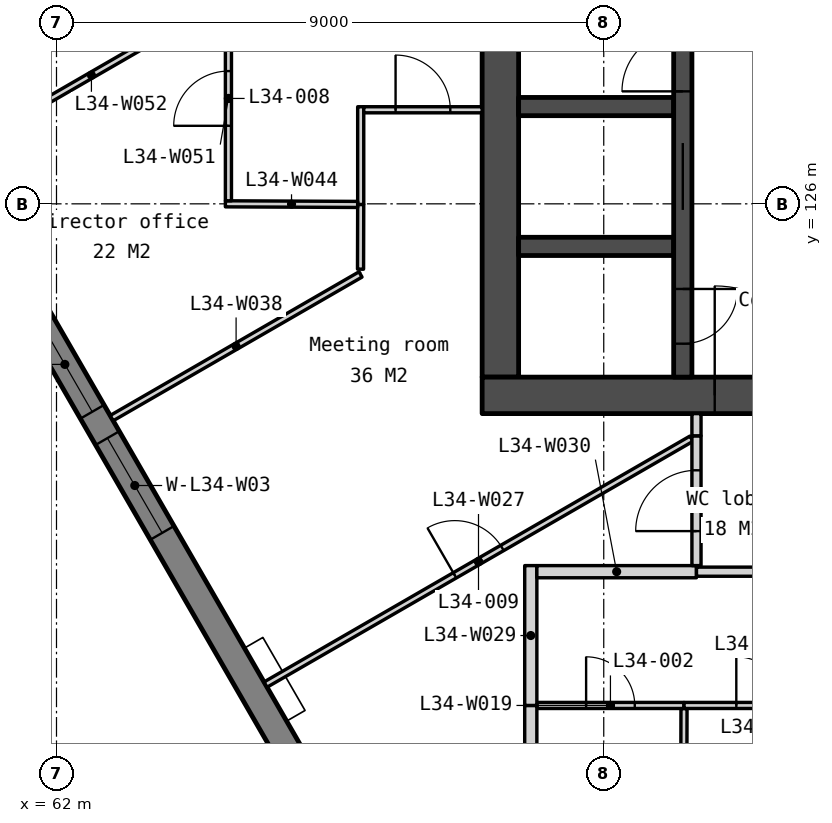
"""IFC4 building model, lengths in metres.
Left out: names, types, materials, properties, quantities, classifications, styles, units other than length and angle.
Written with IfcOpenShell. Run it as: python <this file> out.ifc"""

import sys

from ifc_helpers import new_model, si_unit, direction, frame, frame_2d, origin, place, context, subcontext, project, spatial, polyline, rectangle, outline, extrude, element, fill, save


model = new_model("IFC4")
c1 = context("Model", 3, precision=1e-05, world=origin(), true_north=direction((0.0, 1.0)))
c2 = subcontext(c1, "Body", "Model", "MODEL_VIEW")
j1 = project(units=[si_unit("LENGTHUNIT", "METRE"), si_unit("PLANEANGLEUNIT", "RADIAN")], contexts=[c1])
p1 = place(None, origin())
s1 = spatial("IfcSite", under=j1, at=p1, CompositionType="ELEMENT")
p2 = place(p1, origin())
s2 = spatial("IfcBuilding", under=s1, at=p2, CompositionType="ELEMENT")
p3 = place(p2, frame((0.0, 0.0, 136.4)))
s3 = spatial("IfcBuildingStorey", under=s2, at=p3, CompositionType="ELEMENT", Elevation=136.4)
p4 = place(p3, frame((69.3, 133.95, 0.0), z_axis=(0.0, 0.0, 1.0), x_axis=(0.0, -1.0, 0.0)))
e1 = element("IfcWall", 1, at=p4, inside=s3, PredefinedType="SOLIDWALL", context=c2, shape_type="SweptSolid", body=[
    extrude(rectangle(XDim=10.8, YDim=0.6, at=frame_2d((5.4, 0.0))), origin(), (0.0, 0.0, 1.0), 3.75),
])
p5 = place(p3, frame((69.0, 122.85, 0.0), z_axis=(0.0, 0.0, 1.0), x_axis=(1.0, 0.0, 0.0)))
e2 = element("IfcWall", 2, at=p5, inside=s3, PredefinedType="SOLIDWALL", context=c2, shape_type="SweptSolid", body=[
    extrude(rectangle(XDim=22.0, YDim=0.6, at=frame_2d((11.0, 0.0))), origin(), (0.0, 0.0, 1.0), 3.75),
])
p6 = place(p5, frame((16.375, 0.0, 0.0)))
e3 = element("IfcOpeningElement", 3, at=p6, cuts=e2, PredefinedType="OPENING", context=c2, shape_type="SweptSolid", body=[
    extrude(rectangle(XDim=1.8, YDim=2.1, at=frame_2d((0.9, 1.05))), frame((0.0, 0.31, 0.0), z_axis=(0.0, -1.0, 0.0), x_axis=(1.0, 0.0, 0.0)), (0.0, 0.0, 1.0), 0.62),
])
p7 = place(p5, frame((3.825, 0.0, 0.0)))
e4 = element("IfcOpeningElement", 4, at=p7, cuts=e2, PredefinedType="OPENING", context=c2, shape_type="SweptSolid", body=[
    extrude(rectangle(XDim=1.8, YDim=2.1, at=frame_2d((0.9, 1.05))), frame((0.0, 0.31, 0.0), z_axis=(0.0, -1.0, 0.0), x_axis=(1.0, 0.0, 0.0)), (0.0, 0.0, 1.0), 0.62),
])
p8 = place(p5, frame((12.85, 0.0, 0.0)))
e5 = element("IfcOpeningElement", 5, at=p8, cuts=e2, PredefinedType="OPENING", context=c2, shape_type="SweptSolid", body=[
    extrude(rectangle(XDim=1.5, YDim=2.1, at=frame_2d((0.75, 1.05))), frame((0.0, 0.31, 0.0), z_axis=(0.0, -1.0, 0.0), x_axis=(1.0, 0.0, 0.0)), (0.0, 0.0, 1.0), 0.62),
])
for number, where, z_axis, x_axis in (
    (6, (69.6, 127.6, 0.0), (0.0, 0.0, 1.0), (1.0, 0.0, 0.0)),
    (7, (69.6, 125.3, 0.0), (0.0, 0.0, 1.0), (1.0, 0.0, 0.0)),
):
    element("IfcWall", number, at=place(p3, frame(where, z_axis=z_axis, x_axis=x_axis)), inside=s3, PredefinedType="SOLIDWALL", context=c2, shape_type="SweptSolid", body=[
        extrude(rectangle(XDim=2.55, YDim=0.3, at=frame_2d((1.275, 0.0))), origin(), (0.0, 0.0, 1.0), 3.75),
    ])
p9 = place(p3, frame((72.3, 133.95, 0.0), z_axis=(0.0, 0.0, 1.0), x_axis=(0.0, -1.0, 0.0)))
e8 = element("IfcWall", 8, at=p9, inside=s3, PredefinedType="SOLIDWALL", context=c2, shape_type="SweptSolid", body=[
    extrude(rectangle(XDim=10.8, YDim=0.3, at=frame_2d((5.4, 0.0))), origin(), (0.0, 0.0, 1.0), 3.75),
])
p10 = place(p9, frame((6.95, 0.0, 0.0)))
e9 = element("IfcOpeningElement", 9, at=p10, cuts=e8, PredefinedType="OPENING", context=c2, shape_type="SweptSolid", body=[
    extrude(rectangle(XDim=1.1, YDim=2.1, at=frame_2d((0.55, 1.05))), frame((0.0, 0.16, 0.0), z_axis=(0.0, -1.0, 0.0), x_axis=(1.0, 0.0, 0.0)), (0.0, 0.0, 1.0), 0.32),
])
p11 = place(p9, frame((9.35, 0.0, 0.0)))
e10 = element("IfcOpeningElement", 10, at=p11, cuts=e8, PredefinedType="OPENING", context=c2, shape_type="SweptSolid", body=[
    extrude(rectangle(XDim=0.9, YDim=2.1, at=frame_2d((0.45, 1.05))), frame((0.0, 0.16, 0.0), z_axis=(0.0, -1.0, 0.0), x_axis=(1.0, 0.0, 0.0)), (0.0, 0.0, 1.0), 0.32),
])
p12 = place(p9, frame((5.1, 0.0, 0.0)))
e11 = element("IfcOpeningElement", 11, at=p12, cuts=e8, PredefinedType="OPENING", context=c2, shape_type="SweptSolid", body=[
    extrude(rectangle(XDim=1.0, YDim=2.1, at=frame_2d((0.5, 1.05))), frame((0.0, 0.16, 0.0), z_axis=(0.0, -1.0, 0.0), x_axis=(1.0, 0.0, 0.0)), (0.0, 0.0, 1.0), 0.32),
])
p13 = place(p3, frame((57.652, 131.129, -0.15), z_axis=(0.0, 0.0, 1.0), x_axis=(0.499997369791, -0.866026922331, 0.0)))
e12 = element("IfcWall", 12, at=p13, inside=s3, PredefinedType="SOLIDWALL", context=c2, shape_type="SweptSolid", body=[
    extrude(outline(polyline([(40.486, 0.0), (40.486, 3.9), (0.0, 3.9), (0.0, 0.0), (40.486, 0.0)])), frame((0.0, 0.225, 0.0), z_axis=(0.0, -1.0, 0.0), x_axis=(1.0, 0.0, 0.0)), (0.0, 0.0, 1.0), 0.45),
])
p14 = place(p13, frame((0.87, 0.0, 0.95)))
e13 = element("IfcOpeningElement", 13, at=p14, cuts=e12, PredefinedType="OPENING", context=c2, shape_type="SweptSolid", body=[
    extrude(rectangle(XDim=1.2, YDim=2.2, at=frame_2d((0.6, 1.1))), frame((0.0, 0.235, 0.0), z_axis=(0.0, -1.0, 0.0), x_axis=(1.0, 0.0, 0.0)), (0.0, 0.0, 1.0), 0.47),
])
p15 = place(p13, frame((8.072, 0.0, 0.95)))
e14 = element("IfcOpeningElement", 14, at=p15, cuts=e12, PredefinedType="OPENING", context=c2, shape_type="SweptSolid", body=[
    extrude(rectangle(XDim=1.8, YDim=2.2, at=frame_2d((0.9, 1.1))), frame((0.0, 0.235, 0.0), z_axis=(0.0, -1.0, 0.0), x_axis=(1.0, 0.0, 0.0)), (0.0, 0.0, 1.0), 0.47),
])
p16 = place(p13, frame((10.372, 0.0, 0.95)))
e15 = element("IfcOpeningElement", 15, at=p16, cuts=e12, PredefinedType="OPENING", context=c2, shape_type="SweptSolid", body=[
    extrude(rectangle(XDim=1.8, YDim=2.2, at=frame_2d((0.9, 1.1))), frame((0.0, 0.235, 0.0), z_axis=(0.0, -1.0, 0.0), x_axis=(1.0, 0.0, 0.0)), (0.0, 0.0, 1.0), 0.47),
])
p17 = place(p13, frame((18.193, 0.0, 0.95)))
e16 = element("IfcOpeningElement", 16, at=p17, cuts=e12, PredefinedType="OPENING", context=c2, shape_type="SweptSolid", body=[
    extrude(rectangle(XDim=1.8, YDim=2.2, at=frame_2d((0.9, 1.1))), frame((0.0, 0.235, 0.0), z_axis=(0.0, -1.0, 0.0), x_axis=(1.0, 0.0, 0.0)), (0.0, 0.0, 1.0), 0.47),
])
p18 = place(p13, frame((20.493, 0.0, 0.95)))
e17 = element("IfcOpeningElement", 17, at=p18, cuts=e12, PredefinedType="OPENING", context=c2, shape_type="SweptSolid", body=[
    extrude(rectangle(XDim=1.8, YDim=2.2, at=frame_2d((0.9, 1.1))), frame((0.0, 0.235, 0.0), z_axis=(0.0, -1.0, 0.0), x_axis=(1.0, 0.0, 0.0)), (0.0, 0.0, 1.0), 0.47),
])
p19 = place(p13, frame((28.315, 0.0, 0.95)))
e18 = element("IfcOpeningElement", 18, at=p19, cuts=e12, PredefinedType="OPENING", context=c2, shape_type="SweptSolid", body=[
    extrude(rectangle(XDim=1.8, YDim=2.2, at=frame_2d((0.9, 1.1))), frame((0.0, 0.235, 0.0), z_axis=(0.0, -1.0, 0.0), x_axis=(1.0, 0.0, 0.0)), (0.0, 0.0, 1.0), 0.47),
])
p20 = place(p13, frame((30.615, 0.0, 0.95)))
e19 = element("IfcOpeningElement", 19, at=p20, cuts=e12, PredefinedType="OPENING", context=c2, shape_type="SweptSolid", body=[
    extrude(rectangle(XDim=1.8, YDim=2.2, at=frame_2d((0.9, 1.1))), frame((0.0, 0.235, 0.0), z_axis=(0.0, -1.0, 0.0), x_axis=(1.0, 0.0, 0.0)), (0.0, 0.0, 1.0), 0.47),
])
p21 = place(p13, frame((38.417, 0.0, 0.95)))
e20 = element("IfcOpeningElement", 20, at=p21, cuts=e12, PredefinedType="OPENING", context=c2, shape_type="SweptSolid", body=[
    extrude(rectangle(XDim=1.2, YDim=2.2, at=frame_2d((0.6, 1.1))), frame((0.0, 0.235, 0.0), z_axis=(0.0, -1.0, 0.0), x_axis=(1.0, 0.0, 0.0)), (0.0, 0.0, 1.0), 0.47),
])
p22 = place(p3, frame((72.31, 114.05, 0.0), z_axis=(0.0, 0.0, 1.0), x_axis=(0.002608686776, 0.999996597371, 0.0)))
e21 = element("IfcWall", 21, at=p22, inside=s3, PredefinedType="PARTITIONING", context=c2, shape_type="SweptSolid", body=[
    extrude(rectangle(XDim=3.65, YDim=0.1, at=frame_2d((1.825, 0.0))), origin(), (0.0, 0.0, 1.0), 3.75),
])
p23 = place(p3, frame((69.9, 117.75, 0.0), z_axis=(0.0, 0.0, 1.0), x_axis=(1.0, 0.0, 0.0)))
e22 = element("IfcWall", 22, at=p23, inside=s3, PredefinedType="PARTITIONING", context=c2, shape_type="SweptSolid", body=[
    extrude(rectangle(XDim=2.42, YDim=0.1, at=frame_2d((1.21, 0.0))), origin(), (0.0, 0.0, 1.0), 3.75),
])
p24 = place(p23, frame((0.81, 0.0, 0.0)))
e23 = element("IfcOpeningElement", 23, at=p24, cuts=e22, PredefinedType="OPENING", context=c2, shape_type="SweptSolid", body=[
    extrude(rectangle(XDim=0.8, YDim=2.1, at=frame_2d((0.4, 1.05))), frame((0.0, 0.06, 0.0), z_axis=(0.0, -1.0, 0.0), x_axis=(1.0, 0.0, 0.0)), (0.0, 0.0, 1.0), 0.12),
])
p25 = place(p3, frame((72.32, 117.75, 0.0), z_axis=(0.0, 0.0, 1.0), x_axis=(1.0, 0.0, 0.0)))
e24 = element("IfcWall", 24, at=p25, inside=s3, PredefinedType="PARTITIONING", context=c2, shape_type="SweptSolid", body=[
    extrude(rectangle(XDim=2.52, YDim=0.1, at=frame_2d((1.26, 0.0))), origin(), (0.0, 0.0, 1.0), 3.75),
])
p26 = place(p25, frame((0.86, 0.0, 0.0)))
e25 = element("IfcOpeningElement", 25, at=p26, cuts=e24, PredefinedType="OPENING", context=c2, shape_type="SweptSolid", body=[
    extrude(rectangle(XDim=0.8, YDim=2.1, at=frame_2d((0.4, 1.05))), frame((0.0, 0.06, 0.0), z_axis=(0.0, -1.0, 0.0), x_axis=(1.0, 0.0, 0.0)), (0.0, 0.0, 1.0), 0.12),
])
p27 = place(p3, frame((69.8, 114.768, 0.0), z_axis=(0.0, 0.0, 1.0), x_axis=(0.0, 1.0, 0.0)))
e26 = element("IfcWall", 26, at=p27, inside=s3, PredefinedType="PARTITIONING", context=c2, shape_type="SweptSolid", body=[
    extrude(rectangle(XDim=2.982, YDim=0.2, at=frame_2d((1.491, 0.0))), origin(), (0.0, 0.0, 1.0), 3.75),
])
p28 = place(p3, frame((65.438, 118.093, 0.0), z_axis=(0.0, 0.0, 1.0), x_axis=(0.866029768103, 0.499992440702, 0.0)))
e27 = element("IfcWall", 27, at=p28, inside=s3, PredefinedType="PARTITIONING", context=c2, shape_type="SweptSolid", body=[
    extrude(rectangle(XDim=8.089, YDim=0.1, at=frame_2d((4.044, 0.0))), origin(), (0.0, 0.0, 1.0), 3.75),
])
p29 = place(p28, frame((3.594, 0.0, 0.0)))
e28 = element("IfcOpeningElement", 28, at=p29, cuts=e27, PredefinedType="OPENING", context=c2, shape_type="SweptSolid", body=[
    extrude(rectangle(XDim=0.9, YDim=2.1, at=frame_2d((0.45, 1.05))), frame((0.0, 0.06, 0.0), z_axis=(0.0, -1.0, 0.0), x_axis=(1.0, 0.0, 0.0)), (0.0, 0.0, 1.0), 0.12),
])
p30 = place(p3, frame((69.8, 117.75, 0.0), z_axis=(0.0, 0.0, 1.0), x_axis=(0.0, 1.0, 0.0)))
e29 = element("IfcWall", 29, at=p30, inside=s3, PredefinedType="PARTITIONING", context=c2, shape_type="SweptSolid", body=[
    extrude(rectangle(XDim=2.3, YDim=0.2, at=frame_2d((1.15, 0.0))), origin(), (0.0, 0.0, 1.0), 3.75),
])
p31 = place(p3, frame((69.9, 119.95, 0.0), z_axis=(0.0, 0.0, 1.0), x_axis=(1.0, 0.0, 0.0)))
e30 = element("IfcWall", 30, at=p31, inside=s3, PredefinedType="PARTITIONING", context=c2, shape_type="SweptSolid", body=[
    extrude(rectangle(XDim=2.625, YDim=0.2, at=frame_2d((1.312, 0.0))), origin(), (0.0, 0.0, 1.0), 3.75),
])
p32 = place(p3, frame((72.525, 120.05, 0.0), z_axis=(0.0, 0.0, 1.0), x_axis=(0.0, 1.0, 0.0)))
e31 = element("IfcWall", 31, at=p32, inside=s3, PredefinedType="PARTITIONING", context=c2, shape_type="SweptSolid", body=[
    extrude(rectangle(XDim=2.135, YDim=0.15, at=frame_2d((1.067, 0.0))), origin(), (0.0, 0.0, 1.0), 3.75),
])
p33 = place(p32, frame((0.567, 0.0, 0.0)))
e32 = element("IfcOpeningElement", 32, at=p33, cuts=e31, PredefinedType="OPENING", context=c2, shape_type="SweptSolid", body=[
    extrude(rectangle(XDim=1.0, YDim=2.1, at=frame_2d((0.5, 1.05))), frame((0.0, 0.085, 0.0), z_axis=(0.0, -1.0, 0.0), x_axis=(1.0, 0.0, 0.0)), (0.0, 0.0, 1.0), 0.17),
])
p34 = place(p3, frame((72.525, 119.95, 0.0), z_axis=(0.0, 0.0, 1.0), x_axis=(1.0, 0.0, 0.0)))
e33 = element("IfcWall", 33, at=p34, inside=s3, PredefinedType="PARTITIONING", context=c2, shape_type="SweptSolid", body=[
    extrude(rectangle(XDim=6.2, YDim=0.15, at=frame_2d((3.1, 0.0))), origin(), (0.0, 0.0, 1.0), 3.75),
])
p35 = place(p34, frame((2.6, 0.0, 0.0)))
e34 = element("IfcOpeningElement", 34, at=p35, cuts=e33, PredefinedType="OPENING", context=c2, shape_type="SweptSolid", body=[
    extrude(rectangle(XDim=1.0, YDim=2.1, at=frame_2d((0.5, 1.05))), frame((0.0, 0.085, 0.0), z_axis=(0.0, -1.0, 0.0), x_axis=(1.0, 0.0, 0.0)), (0.0, 0.0, 1.0), 0.17),
])
p36 = place(p3, frame((72.525, 122.185, 0.0), z_axis=(0.0, 0.0, 1.0), x_axis=(0.0, 1.0, 0.0)))
e35 = element("IfcWall", 35, at=p36, inside=s3, PredefinedType="PARTITIONING", context=c2, shape_type="SweptSolid", body=[
    extrude(rectangle(XDim=0.365, YDim=0.15, at=frame_2d((0.183, 0.0))), origin(), (0.0, 0.0, 1.0), 3.75),
])
p37 = place(p3, frame((62.907, 122.476, 0.0), z_axis=(0.0, 0.0, 1.0), x_axis=(0.866028145587, 0.499995251029, 0.0)))
e36 = element("IfcWall", 36, at=p37, inside=s3, PredefinedType="PARTITIONING", context=c2, shape_type="SweptSolid", body=[
    extrude(rectangle(XDim=4.726, YDim=0.1, at=frame_2d((2.363, 0.0))), origin(), (0.0, 0.0, 1.0), 3.75),
])
p38 = place(p3, frame((67.0, 124.926, 0.0), z_axis=(0.0, 0.0, 1.0), x_axis=(0.00252292775, 0.999996817413, 0.0)))
e37 = element("IfcWall", 37, at=p38, inside=s3, PredefinedType="PARTITIONING", context=c2, shape_type="SweptSolid", body=[
    extrude(rectangle(XDim=1.064, YDim=0.1, at=frame_2d((0.532, 0.0))), origin(), (0.0, 0.0, 1.0), 3.75),
])
p39 = place(p3, frame((67.003, 125.99, 0.0), z_axis=(0.0, 0.0, 1.0), x_axis=(0.0, 1.0, 0.0)))
e38 = element("IfcWall", 38, at=p39, inside=s3, PredefinedType="PARTITIONING", context=c2, shape_type="SweptSolid", body=[
    extrude(rectangle(XDim=1.607, YDim=0.1, at=frame_2d((0.803, 0.0))), origin(), (0.0, 0.0, 1.0), 3.75),
])
p40 = place(p3, frame((64.778, 126.0, 0.0), z_axis=(0.0, 0.0, 1.0), x_axis=(0.999989412939, -0.004601522551, 0.0)))
e39 = element("IfcWall", 39, at=p40, inside=s3, PredefinedType="PARTITIONING", context=c2, shape_type="SweptSolid", body=[
    extrude(rectangle(XDim=2.175, YDim=0.1, at=frame_2d((1.088, 0.0))), origin(), (0.0, 0.0, 1.0), 3.75),
])
p41 = place(p3, frame((67.053, 127.547, 0.0), z_axis=(0.0, 0.0, 1.0), x_axis=(0.999999992138, 0.000125391849, 0.0)))
e40 = element("IfcWall", 40, at=p41, inside=s3, PredefinedType="PARTITIONING", context=c2, shape_type="SweptSolid", body=[
    extrude(rectangle(XDim=1.947, YDim=0.1, at=frame_2d((0.974, 0.0))), origin(), (0.0, 0.0, 1.0), 3.75),
])
p42 = place(p41, frame((0.523, 0.0, 0.0)))
e41 = element("IfcOpeningElement", 41, at=p42, cuts=e40, PredefinedType="OPENING", context=c2, shape_type="SweptSolid", body=[
    extrude(rectangle(XDim=0.9, YDim=2.1, at=frame_2d((0.45, 1.05))), frame((0.0, 0.06, 0.0), z_axis=(0.0, -1.0, 0.0), x_axis=(1.0, 0.0, 0.0)), (0.0, 0.0, 1.0), 0.12),
])
p43 = place(p3, frame((64.828, 126.05, 0.0), z_axis=(0.0, 0.0, 1.0), x_axis=(0.0, 1.0, 0.0)))
e42 = element("IfcWall", 42, at=p43, inside=s3, PredefinedType="PARTITIONING", context=c2, shape_type="SweptSolid", body=[
    extrude(rectangle(XDim=3.367, YDim=0.1, at=frame_2d((1.683, 0.0))), origin(), (0.0, 0.0, 1.0), 3.75),
])
p44 = place(p43, frame((1.233, 0.0, 0.0)))
e43 = element("IfcOpeningElement", 43, at=p44, cuts=e42, PredefinedType="OPENING", context=c2, shape_type="SweptSolid", body=[
    extrude(rectangle(XDim=0.9, YDim=2.1, at=frame_2d((0.45, 1.05))), frame((0.0, 0.06, 0.0), z_axis=(0.0, -1.0, 0.0), x_axis=(1.0, 0.0, 0.0)), (0.0, 0.0, 1.0), 0.12),
])
p45 = place(p3, frame((60.382, 126.85, 0.0), z_axis=(0.0, 0.0, 1.0), x_axis=(0.866041859802, 0.499971496258, 0.0)))
e44 = element("IfcWall", 44, at=p45, inside=s3, PredefinedType="PARTITIONING", context=c2, shape_type="SweptSolid", body=[
    extrude(rectangle(XDim=5.063, YDim=0.1, at=frame_2d((2.532, 0.0))), origin(), (0.0, 0.0, 1.0), 3.75),
])
p46 = place(p10, origin())
e45 = element("IfcDoor", 45, at=p46, inside=s3, OperationType="SLIDING_TO_LEFT", PredefinedType="DOOR", context=c2, shape_type="SweptSolid", body=[
    extrude(rectangle(XDim=1.1, YDim=2.1, at=frame_2d((0.55, 1.05))), frame((0.0, 0.025, 0.0), z_axis=(0.0, -1.0, 0.0), x_axis=(1.0, 0.0, 0.0)), (0.0, 0.0, 1.0), 0.05),
])
fill(e9, e45)
p47 = place(p7, origin())
e46 = element("IfcDoor", 46, at=p47, inside=s3, OperationType="DOUBLE_DOOR_DOUBLE_SWING", PredefinedType="DOOR", context=c2, shape_type="SweptSolid", body=[
    extrude(rectangle(XDim=1.8, YDim=2.1, at=frame_2d((0.9, 1.05))), frame((0.0, 0.025, 0.0), z_axis=(0.0, -1.0, 0.0), x_axis=(1.0, 0.0, 0.0)), (0.0, 0.0, 1.0), 0.05),
])
fill(e4, e46)
p48 = place(p11, origin())
e47 = element("IfcDoor", 47, at=p48, inside=s3, OperationType="SINGLE_SWING_LEFT", PredefinedType="DOOR", context=c2, shape_type="SweptSolid", body=[
    extrude(rectangle(XDim=0.9, YDim=2.1, at=frame_2d((0.45, 1.05))), frame((0.0, 0.025, 0.0), z_axis=(0.0, -1.0, 0.0), x_axis=(1.0, 0.0, 0.0)), (0.0, 0.0, 1.0), 0.05),
])
fill(e10, e47)
p49 = place(p12, origin())
e48 = element("IfcDoor", 48, at=p49, inside=s3, OperationType="SINGLE_SWING_RIGHT", PredefinedType="DOOR", context=c2, shape_type="SweptSolid", body=[
    extrude(rectangle(XDim=1.0, YDim=2.1, at=frame_2d((0.5, 1.05))), frame((0.0, 0.025, 0.0), z_axis=(0.0, -1.0, 0.0), x_axis=(1.0, 0.0, 0.0)), (0.0, 0.0, 1.0), 0.05),
])
fill(e11, e48)
p50 = place(p15, origin())
e49 = element("IfcWindow", 49, at=p50, inside=s3, PartitioningType="SINGLE_PANEL", PredefinedType="WINDOW", context=c2, shape_type="SweptSolid", body=[
    extrude(rectangle(XDim=1.8, YDim=2.2, at=frame_2d((0.9, 1.1))), frame((0.0, 0.03, 0.0), z_axis=(0.0, -1.0, 0.0), x_axis=(1.0, 0.0, 0.0)), (0.0, 0.0, 1.0), 0.06),
])
fill(e14, e49)
p51 = place(p16, origin())
e50 = element("IfcWindow", 50, at=p51, inside=s3, PartitioningType="SINGLE_PANEL", PredefinedType="WINDOW", context=c2, shape_type="SweptSolid", body=[
    extrude(rectangle(XDim=1.8, YDim=2.2, at=frame_2d((0.9, 1.1))), frame((0.0, 0.03, 0.0), z_axis=(0.0, -1.0, 0.0), x_axis=(1.0, 0.0, 0.0)), (0.0, 0.0, 1.0), 0.06),
])
fill(e15, e50)
p52 = place(p24, origin())
e51 = element("IfcDoor", 51, at=p52, inside=s3, OperationType="SINGLE_SWING_LEFT", PredefinedType="DOOR", context=c2, shape_type="SweptSolid", body=[
    extrude(rectangle(XDim=0.8, YDim=2.1, at=frame_2d((0.4, 1.05))), frame((0.0, 0.025, 0.0), z_axis=(0.0, -1.0, 0.0), x_axis=(1.0, 0.0, 0.0)), (0.0, 0.0, 1.0), 0.05),
])
fill(e23, e51)
p53 = place(p26, origin())
e52 = element("IfcDoor", 52, at=p53, inside=s3, OperationType="SINGLE_SWING_LEFT", PredefinedType="DOOR", context=c2, shape_type="SweptSolid", body=[
    extrude(rectangle(XDim=0.8, YDim=2.1, at=frame_2d((0.4, 1.05))), frame((0.0, 0.025, 0.0), z_axis=(0.0, -1.0, 0.0), x_axis=(1.0, 0.0, 0.0)), (0.0, 0.0, 1.0), 0.05),
])
fill(e25, e52)
p54 = place(p42, origin())
e53 = element("IfcDoor", 53, at=p54, inside=s3, OperationType="SINGLE_SWING_LEFT", PredefinedType="DOOR", context=c2, shape_type="SweptSolid", body=[
    extrude(rectangle(XDim=0.9, YDim=2.1, at=frame_2d((0.45, 1.05))), frame((0.0, 0.025, 0.0), z_axis=(0.0, -1.0, 0.0), x_axis=(1.0, 0.0, 0.0)), (0.0, 0.0, 1.0), 0.05),
])
fill(e41, e53)
p55 = place(p44, origin())
e54 = element("IfcDoor", 54, at=p55, inside=s3, OperationType="SINGLE_SWING_LEFT", PredefinedType="DOOR", context=c2, shape_type="SweptSolid", body=[
    extrude(rectangle(XDim=0.9, YDim=2.1, at=frame_2d((0.45, 1.05))), frame((0.0, 0.025, 0.0), z_axis=(0.0, -1.0, 0.0), x_axis=(1.0, 0.0, 0.0)), (0.0, 0.0, 1.0), 0.05),
])
fill(e43, e54)
p56 = place(p29, origin())
e55 = element("IfcDoor", 55, at=p56, inside=s3, OperationType="SINGLE_SWING_LEFT", PredefinedType="DOOR", context=c2, shape_type="SweptSolid", body=[
    extrude(rectangle(XDim=0.9, YDim=2.1, at=frame_2d((0.45, 1.05))), frame((0.0, 0.025, 0.0), z_axis=(0.0, -1.0, 0.0), x_axis=(1.0, 0.0, 0.0)), (0.0, 0.0, 1.0), 0.05),
])
fill(e28, e55)
p57 = place(p33, origin())
e56 = element("IfcDoor", 56, at=p57, inside=s3, OperationType="SINGLE_SWING_LEFT", PredefinedType="DOOR", context=c2, shape_type="SweptSolid", body=[
    extrude(rectangle(XDim=1.0, YDim=2.1, at=frame_2d((0.5, 1.05))), frame((0.0, 0.025, 0.0), z_axis=(0.0, -1.0, 0.0), x_axis=(1.0, 0.0, 0.0)), (0.0, 0.0, 1.0), 0.05),
])
fill(e32, e56)
save(model, sys.argv[1])
